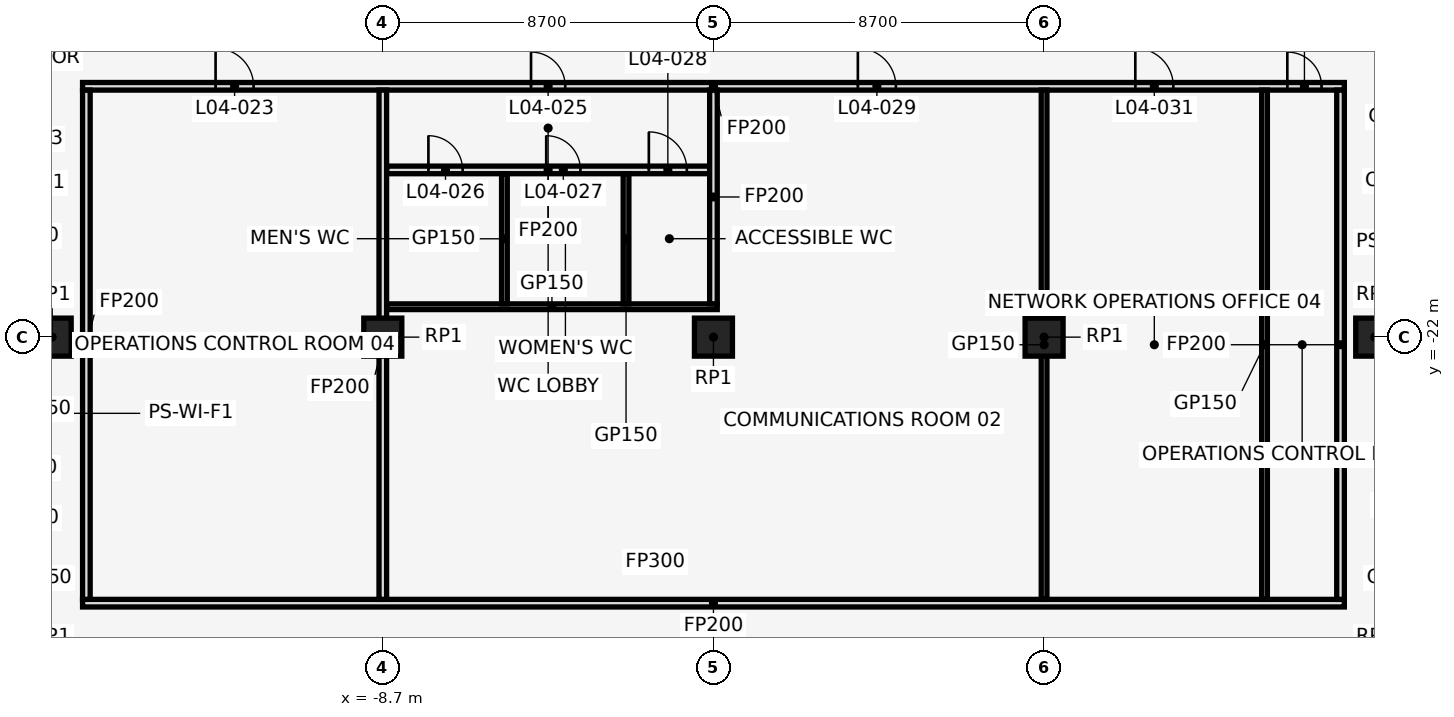
"""IFC4 building model, lengths in metres.
Left out: names, types, materials, properties, quantities, classifications, styles, units other than length and angle.
Written with IfcOpenShell. Run it as: python <this file> out.ifc"""

import sys

from ifc_helpers import new_model, si_unit, direction, frame, frame_2d, origin, origin_2d, place, context, subcontext, project, spatial, rectangle, extrude, element, fill, save


model = new_model("IFC4")
c1 = context("Model", 3, precision=1e-05, world=origin(), true_north=direction((0.0, 1.0)))
c2 = subcontext(c1, "Body", "Model", "MODEL_VIEW")
j1 = project(units=[si_unit("LENGTHUNIT", "METRE"), si_unit("PLANEANGLEUNIT", "RADIAN")], contexts=[c1])
p1 = place(None, origin())
s1 = spatial("IfcSite", under=j1, at=p1, CompositionType="ELEMENT")
p2 = place(p1, origin())
s2 = spatial("IfcBuilding", under=s1, at=p2, CompositionType="ELEMENT")
p3 = place(p2, frame((0.0, 0.0, 25.0)))
s3 = spatial("IfcBuildingStorey", under=s2, at=p3, CompositionType="ELEMENT", Elevation=25.0)
p4 = place(p3, frame((-17.4, -22.0, 0.0), z_axis=(0.0, 0.0, 1.0), x_axis=(1.0, 0.0, 0.0)))
e1 = element("IfcColumn", 1, at=p4, inside=s3, PredefinedType="COLUMN", context=c2, shape_type="SweptSolid", body=[
    extrude(rectangle(XDim=1.0, YDim=1.0, at=origin_2d()), origin(), (0.0, 0.0, 1.0), 5.0),
])
for number, where, z_axis, x_axis in (
    (2, (-8.7, -22.0, -0.3), (0.0, 0.0, 1.0), (1.0, 0.0, 0.0)),
    (3, (0.0, -22.0, -0.3), (0.0, 0.0, 1.0), (1.0, 0.0, 0.0)),
    (4, (8.7, -22.0, -0.3), (0.0, 0.0, 1.0), (1.0, 0.0, 0.0)),
):
    element("IfcColumn", number, at=place(p3, frame(where, z_axis=z_axis, x_axis=x_axis)), inside=s3, PredefinedType="COLUMN", context=c2, shape_type="SweptSolid", body=[
        extrude(rectangle(XDim=1.0, YDim=1.0, at=origin_2d()), origin(), (0.0, 0.0, 1.0), 5.3),
    ])
p5 = place(p3, frame((17.4, -22.0, 0.0), z_axis=(0.0, 0.0, 1.0), x_axis=(1.0, 0.0, 0.0)))
e5 = element("IfcColumn", 5, at=p5, inside=s3, PredefinedType="COLUMN", context=c2, shape_type="SweptSolid", body=[
    extrude(rectangle(XDim=1.0, YDim=1.0, at=origin_2d()), origin(), (0.0, 0.0, 1.0), 5.0),
])
p6 = place(p3, frame((-16.6, -29.0, 0.0), z_axis=(0.0, 0.0, 1.0), x_axis=(1.0, 0.0, 0.0)))
e6 = element("IfcWall", 6, at=p6, inside=s3, PredefinedType="PARTITIONING", context=c2, shape_type="SweptSolid", body=[
    extrude(rectangle(XDim=33.2, YDim=0.2, at=frame_2d((16.6, 0.0))), origin(), (0.0, 0.0, 1.0), 4.7),
])
p7 = place(p3, frame((-8.6, -21.2, 0.0), z_axis=(0.0, 0.0, 1.0), x_axis=(1.0, 0.0, 0.0)))
e7 = element("IfcWall", 7, at=p7, inside=s3, PredefinedType="PARTITIONING", context=c2, shape_type="SweptSolid", body=[
    extrude(rectangle(XDim=8.7, YDim=0.15, at=frame_2d((4.35, 0.0))), origin(), (0.0, 0.0, 1.0), 4.7),
])
p8 = place(p3, frame((-8.6, -17.6, 0.0), z_axis=(0.0, 0.0, 1.0), x_axis=(1.0, 0.0, 0.0)))
e8 = element("IfcWall", 8, at=p8, inside=s3, PredefinedType="PARTITIONING", context=c2, shape_type="SweptSolid", body=[
    extrude(rectangle(XDim=8.5, YDim=0.2, at=frame_2d((4.25, 0.0))), origin(), (0.0, 0.0, 1.0), 4.7),
])
p9 = place(p8, frame((1.1, 0.0, 0.0)))
e9 = element("IfcOpeningElement", 9, at=p9, cuts=e8, PredefinedType="OPENING", context=c2, shape_type="SweptSolid", body=[
    extrude(rectangle(XDim=0.9, YDim=2.1, at=frame_2d((0.45, 1.05))), frame((0.0, 0.112, 0.0), z_axis=(0.0, -1.0, 0.0), x_axis=(1.0, 0.0, 0.0)), (0.0, 0.0, 1.0), 0.224),
])
p10 = place(p8, frame((4.2, 0.0, 0.0)))
e10 = element("IfcOpeningElement", 10, at=p10, cuts=e8, PredefinedType="OPENING", context=c2, shape_type="SweptSolid", body=[
    extrude(rectangle(XDim=0.9, YDim=2.1, at=frame_2d((0.45, 1.05))), frame((0.0, 0.112, 0.0), z_axis=(0.0, -1.0, 0.0), x_axis=(1.0, 0.0, 0.0)), (0.0, 0.0, 1.0), 0.224),
])
p11 = place(p8, frame((6.9, 0.0, 0.0)))
e11 = element("IfcOpeningElement", 11, at=p11, cuts=e8, PredefinedType="OPENING", context=c2, shape_type="SweptSolid", body=[
    extrude(rectangle(XDim=1.0, YDim=2.1, at=frame_2d((0.5, 1.05))), frame((0.0, 0.112, 0.0), z_axis=(0.0, -1.0, 0.0), x_axis=(1.0, 0.0, 0.0)), (0.0, 0.0, 1.0), 0.224),
])
p12 = place(p3, frame((-16.6, -15.4, 0.0), z_axis=(0.0, 0.0, 1.0), x_axis=(1.0, 0.0, 0.0)))
e12 = element("IfcWall", 12, at=p12, inside=s3, PredefinedType="PARTITIONING", context=c2, shape_type="SweptSolid", body=[
    extrude(rectangle(XDim=33.2, YDim=0.2, at=frame_2d((16.6, 0.0))), origin(), (0.0, 0.0, 1.0), 4.7),
])
p13 = place(p12, frame((3.5, 0.0, 0.0)))
e13 = element("IfcOpeningElement", 13, at=p13, cuts=e12, PredefinedType="OPENING", context=c2, shape_type="SweptSolid", body=[
    extrude(rectangle(XDim=1.0, YDim=2.1, at=frame_2d((0.5, 1.05))), frame((0.0, 0.112, 0.0), z_axis=(0.0, -1.0, 0.0), x_axis=(1.0, 0.0, 0.0)), (0.0, 0.0, 1.0), 0.224),
])
p14 = place(p12, frame((11.8, 0.0, 0.0)))
e14 = element("IfcOpeningElement", 14, at=p14, cuts=e12, PredefinedType="OPENING", context=c2, shape_type="SweptSolid", body=[
    extrude(rectangle(XDim=0.9, YDim=2.1, at=frame_2d((0.45, 1.05))), frame((0.0, 0.112, 0.0), z_axis=(0.0, -1.0, 0.0), x_axis=(1.0, 0.0, 0.0)), (0.0, 0.0, 1.0), 0.224),
])
p15 = place(p12, frame((20.4, 0.0, 0.0)))
e15 = element("IfcOpeningElement", 15, at=p15, cuts=e12, PredefinedType="OPENING", context=c2, shape_type="SweptSolid", body=[
    extrude(rectangle(XDim=1.0, YDim=2.1, at=frame_2d((0.5, 1.05))), frame((0.0, 0.112, 0.0), z_axis=(0.0, -1.0, 0.0), x_axis=(1.0, 0.0, 0.0)), (0.0, 0.0, 1.0), 0.224),
])
p16 = place(p12, frame((27.7, 0.0, 0.0)))
e16 = element("IfcOpeningElement", 16, at=p16, cuts=e12, PredefinedType="OPENING", context=c2, shape_type="SweptSolid", body=[
    extrude(rectangle(XDim=1.0, YDim=2.1, at=frame_2d((0.5, 1.05))), frame((0.0, 0.112, 0.0), z_axis=(0.0, -1.0, 0.0), x_axis=(1.0, 0.0, 0.0)), (0.0, 0.0, 1.0), 0.224),
])
p17 = place(p12, frame((31.7, 0.0, 0.0)))
e17 = element("IfcOpeningElement", 17, at=p17, cuts=e12, PredefinedType="OPENING", context=c2, shape_type="SweptSolid", body=[
    extrude(rectangle(XDim=0.9, YDim=2.1, at=frame_2d((0.45, 1.05))), frame((0.0, 0.112, 0.0), z_axis=(0.0, -1.0, 0.0), x_axis=(1.0, 0.0, 0.0)), (0.0, 0.0, 1.0), 0.224),
])
for number, where, z_axis, x_axis in (
    (18, (-16.5, -28.9, 0.0), (0.0, 0.0, 1.0), (0.0, 1.0, 0.0)),
    (19, (-8.7, -28.9, 0.0), (0.0, 0.0, 1.0), (0.0, 1.0, 0.0)),
):
    element("IfcWall", number, at=place(p3, frame(where, z_axis=z_axis, x_axis=x_axis)), inside=s3, PredefinedType="PARTITIONING", context=c2, shape_type="SweptSolid", body=[
        extrude(rectangle(XDim=13.4, YDim=0.2, at=frame_2d((6.7, 0.0))), origin(), (0.0, 0.0, 1.0), 4.7),
    ])
for number, where, z_axis, x_axis in (
    (20, (-5.5, -21.125, 0.0), (0.0, 0.0, 1.0), (0.0, 1.0, 0.0)),
    (21, (-2.3, -21.125, 0.0), (0.0, 0.0, 1.0), (0.0, 1.0, 0.0)),
):
    element("IfcWall", number, at=place(p3, frame(where, z_axis=z_axis, x_axis=x_axis)), inside=s3, PredefinedType="PARTITIONING", context=c2, shape_type="SweptSolid", body=[
        extrude(rectangle(XDim=3.425, YDim=0.15, at=frame_2d((1.712, 0.0))), origin(), (0.0, 0.0, 1.0), 4.7),
    ])
p18 = place(p3, frame((0.0, -21.125, 0.0), z_axis=(0.0, 0.0, 1.0), x_axis=(0.0, 1.0, 0.0)))
e22 = element("IfcWall", 22, at=p18, inside=s3, PredefinedType="PARTITIONING", context=c2, shape_type="SweptSolid", body=[
    extrude(rectangle(XDim=5.625, YDim=0.2, at=frame_2d((2.812, 0.0))), origin(), (0.0, 0.0, 1.0), 4.7),
])
for number, where, z_axis, x_axis in (
    (23, (8.7, -28.9, 0.0), (0.0, 0.0, 1.0), (0.0, 1.0, 0.0)),
    (24, (14.5, -28.9, 0.0), (0.0, 0.0, 1.0), (0.0, 1.0, 0.0)),
):
    element("IfcWall", number, at=place(p3, frame(where, z_axis=z_axis, x_axis=x_axis)), inside=s3, PredefinedType="PARTITIONING", context=c2, shape_type="SweptSolid", body=[
        extrude(rectangle(XDim=13.4, YDim=0.15, at=frame_2d((6.7, 0.0))), origin(), (0.0, 0.0, 1.0), 4.7),
    ])
p19 = place(p3, frame((16.5, -28.9, 0.0), z_axis=(0.0, 0.0, 1.0), x_axis=(0.0, 1.0, 0.0)))
e25 = element("IfcWall", 25, at=p19, inside=s3, PredefinedType="PARTITIONING", context=c2, shape_type="SweptSolid", body=[
    extrude(rectangle(XDim=13.4, YDim=0.2, at=frame_2d((6.7, 0.0))), origin(), (0.0, 0.0, 1.0), 4.7),
])
p20 = place(p13, frame((1.0, 0.0, 0.0), z_axis=(0.0, 0.0, 1.0), x_axis=(-1.0, 0.0, 0.0)))
e26 = element("IfcDoor", 26, at=p20, inside=s3, OperationType="SINGLE_SWING_RIGHT", PredefinedType="DOOR", context=c2, shape_type="SweptSolid", body=[
    extrude(rectangle(XDim=1.0, YDim=2.1, at=frame_2d((0.5, 1.05))), frame((0.0, 0.025, 0.0), z_axis=(0.0, -1.0, 0.0), x_axis=(1.0, 0.0, 0.0)), (0.0, 0.0, 1.0), 0.05),
])
fill(e13, e26)
p21 = place(p14, frame((0.9, 0.0, 0.0), z_axis=(0.0, 0.0, 1.0), x_axis=(-1.0, 0.0, 0.0)))
e27 = element("IfcDoor", 27, at=p21, inside=s3, OperationType="SINGLE_SWING_LEFT", PredefinedType="DOOR", context=c2, shape_type="SweptSolid", body=[
    extrude(rectangle(XDim=0.9, YDim=2.1, at=frame_2d((0.45, 1.05))), frame((0.0, 0.025, 0.0), z_axis=(0.0, -1.0, 0.0), x_axis=(1.0, 0.0, 0.0)), (0.0, 0.0, 1.0), 0.05),
])
fill(e14, e27)
p22 = place(p9, frame((0.9, 0.0, 0.0), z_axis=(0.0, 0.0, 1.0), x_axis=(-1.0, 0.0, 0.0)))
e28 = element("IfcDoor", 28, at=p22, inside=s3, OperationType="SINGLE_SWING_RIGHT", PredefinedType="DOOR", context=c2, shape_type="SweptSolid", body=[
    extrude(rectangle(XDim=0.9, YDim=2.1, at=frame_2d((0.45, 1.05))), frame((0.0, 0.025, 0.0), z_axis=(0.0, -1.0, 0.0), x_axis=(1.0, 0.0, 0.0)), (0.0, 0.0, 1.0), 0.05),
])
fill(e9, e28)
p23 = place(p10, frame((0.9, 0.0, 0.0), z_axis=(0.0, 0.0, 1.0), x_axis=(-1.0, 0.0, 0.0)))
e29 = element("IfcDoor", 29, at=p23, inside=s3, OperationType="SINGLE_SWING_RIGHT", PredefinedType="DOOR", context=c2, shape_type="SweptSolid", body=[
    extrude(rectangle(XDim=0.9, YDim=2.1, at=frame_2d((0.45, 1.05))), frame((0.0, 0.025, 0.0), z_axis=(0.0, -1.0, 0.0), x_axis=(1.0, 0.0, 0.0)), (0.0, 0.0, 1.0), 0.05),
])
fill(e10, e29)
p24 = place(p11, frame((1.0, 0.0, 0.0), z_axis=(0.0, 0.0, 1.0), x_axis=(-1.0, 0.0, 0.0)))
e30 = element("IfcDoor", 30, at=p24, inside=s3, OperationType="SINGLE_SWING_LEFT", PredefinedType="DOOR", context=c2, shape_type="SweptSolid", body=[
    extrude(rectangle(XDim=1.0, YDim=2.1, at=frame_2d((0.5, 1.05))), frame((0.0, 0.025, 0.0), z_axis=(0.0, -1.0, 0.0), x_axis=(1.0, 0.0, 0.0)), (0.0, 0.0, 1.0), 0.05),
])
fill(e11, e30)
p25 = place(p15, frame((1.0, 0.0, 0.0), z_axis=(0.0, 0.0, 1.0), x_axis=(-1.0, 0.0, 0.0)))
e31 = element("IfcDoor", 31, at=p25, inside=s3, OperationType="SINGLE_SWING_RIGHT", PredefinedType="DOOR", context=c2, shape_type="SweptSolid", body=[
    extrude(rectangle(XDim=1.0, YDim=2.1, at=frame_2d((0.5, 1.05))), frame((0.0, 0.025, 0.0), z_axis=(0.0, -1.0, 0.0), x_axis=(1.0, 0.0, 0.0)), (0.0, 0.0, 1.0), 0.05),
])
fill(e15, e31)
p26 = place(p16, frame((1.0, 0.0, 0.0), z_axis=(0.0, 0.0, 1.0), x_axis=(-1.0, 0.0, 0.0)))
e32 = element("IfcDoor", 32, at=p26, inside=s3, OperationType="SINGLE_SWING_LEFT", PredefinedType="DOOR", context=c2, shape_type="SweptSolid", body=[
    extrude(rectangle(XDim=1.0, YDim=2.1, at=frame_2d((0.5, 1.05))), frame((0.0, 0.025, 0.0), z_axis=(0.0, -1.0, 0.0), x_axis=(1.0, 0.0, 0.0)), (0.0, 0.0, 1.0), 0.05),
])
fill(e16, e32)
p27 = place(p17, frame((0.9, 0.0, 0.0), z_axis=(0.0, 0.0, 1.0), x_axis=(-1.0, 0.0, 0.0)))
e33 = element("IfcDoor", 33, at=p27, inside=s3, OperationType="SINGLE_SWING_RIGHT", PredefinedType="DOOR", context=c2, shape_type="SweptSolid", body=[
    extrude(rectangle(XDim=0.9, YDim=2.1, at=frame_2d((0.45, 1.05))), frame((0.0, 0.025, 0.0), z_axis=(0.0, -1.0, 0.0), x_axis=(1.0, 0.0, 0.0)), (0.0, 0.0, 1.0), 0.05),
])
fill(e17, e33)
save(model, sys.argv[1])
